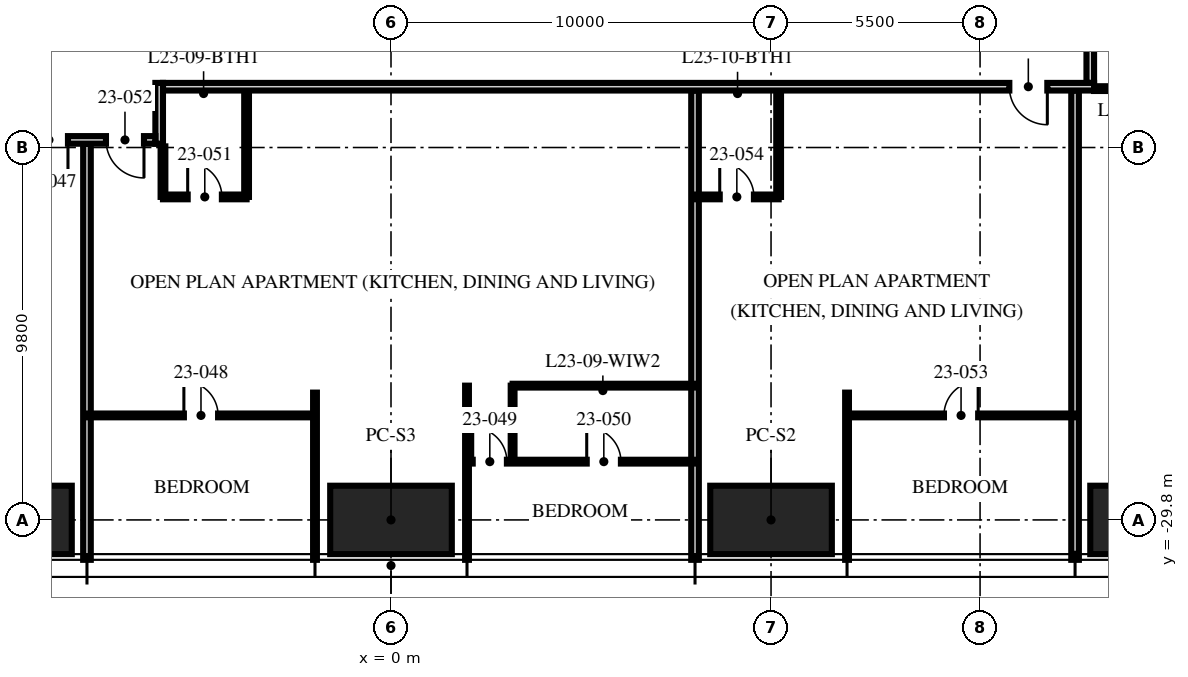
"""IFC4 building model, lengths in metres.
Left out: names, types, materials, properties, quantities, classifications, styles, units other than length and angle.
Written with IfcOpenShell. Run it as: python <this file> out.ifc"""

import sys

from ifc_helpers import new_model, si_unit, direction, frame, frame_2d, origin, origin_2d, place, context, subcontext, project, spatial, rectangle, hollow_rectangle, extrude, element, fill, save


model = new_model("IFC4")
c1 = context("Model", 3, precision=1e-05, world=origin(), true_north=direction((0.0, 1.0)))
c2 = subcontext(c1, "Body", "Model", "MODEL_VIEW")
j1 = project(units=[si_unit("LENGTHUNIT", "METRE"), si_unit("PLANEANGLEUNIT", "RADIAN")], contexts=[c1])
p1 = place(None, origin())
s1 = spatial("IfcSite", under=j1, at=p1, CompositionType="ELEMENT")
p2 = place(p1, origin())
s2 = spatial("IfcBuilding", under=s1, at=p2, CompositionType="ELEMENT")
p3 = place(p2, frame((0.0, 0.0, 92.25)))
s3 = spatial("IfcBuildingStorey", under=s2, at=p3, CompositionType="ELEMENT", Elevation=92.25)
for number, where, z_axis, x_axis in (
    (1, (20.0, -29.8, 0.0), (0.0, 0.0, 1.0), (1.0, 0.0, 0.0)),
    (2, (10.0, -29.8, 0.0), (0.0, 0.0, 1.0), (1.0, 0.0, 0.0)),
    (3, (0.0, -29.8, 0.0), (0.0, 0.0, 1.0), (1.0, 0.0, 0.0)),
    (4, (-10.0, -29.8, 0.0), (0.0, 0.0, 1.0), (1.0, 0.0, 0.0)),
):
    element("IfcColumn", number, at=place(p3, frame(where, z_axis=z_axis, x_axis=x_axis)), inside=s3, PredefinedType="COLUMN", context=c2, shape_type="SweptSolid", body=[
        extrude(hollow_rectangle(XDim=3.2, YDim=1.8, WallThickness=0.2, at=origin_2d()), origin(), (0.0, 0.0, 1.0), 3.75),
    ])
p4 = place(p3, frame((-8.0, -19.9, 0.0), z_axis=(0.0, 0.0, 1.0), x_axis=(0.0, -1.0, 0.0)))
e5 = element("IfcWall", 5, at=p4, inside=s3, PredefinedType="PARTITIONING", context=c2, shape_type="SweptSolid", body=[
    extrude(rectangle(XDim=10.95, YDim=0.2, at=frame_2d((5.475, 0.0))), origin(), (0.0, 0.0, 1.0), 2.61),
])
p5 = place(p3, frame((-2.0, -26.45, 0.0), z_axis=(0.0, 0.0, 1.0), x_axis=(0.0, -1.0, 0.0)))
e6 = element("IfcWall", 6, at=p5, inside=s3, PredefinedType="PARTITIONING", context=c2, shape_type="SweptSolid", body=[
    extrude(rectangle(XDim=4.4, YDim=0.1, at=frame_2d((2.2, 0.0))), origin(), (0.0, 0.0, 1.0), 2.61),
])
p6 = place(p3, frame((2.0, -26.267, 0.0), z_axis=(0.0, 0.0, 1.0), x_axis=(0.0, -1.0, 0.0)))
e7 = element("IfcWall", 7, at=p6, inside=s3, PredefinedType="PARTITIONING", context=c2, shape_type="SweptSolid", body=[
    extrude(rectangle(XDim=4.583, YDim=0.1, at=frame_2d((2.292, 0.0))), origin(), (0.0, 0.0, 1.0), 2.61),
])
p7 = place(p3, frame((8.0, -18.5, 0.0), z_axis=(0.0, 0.0, 1.0), x_axis=(0.0, -1.0, 0.0)))
e8 = element("IfcWall", 8, at=p7, inside=s3, PredefinedType="PARTITIONING", context=c2, shape_type="SweptSolid", body=[
    extrude(rectangle(XDim=12.35, YDim=0.2, at=frame_2d((6.175, 0.0))), origin(), (0.0, 0.0, 1.0), 2.61),
])
p8 = place(p3, frame((12.0, -26.45, 0.0), z_axis=(0.0, 0.0, 1.0), x_axis=(0.0, -1.0, 0.0)))
e9 = element("IfcWall", 9, at=p8, inside=s3, PredefinedType="PARTITIONING", context=c2, shape_type="SweptSolid", body=[
    extrude(rectangle(XDim=4.4, YDim=0.1, at=frame_2d((2.2, 0.0))), origin(), (0.0, 0.0, 1.0), 2.61),
])
p9 = place(p3, frame((18.0, -18.5, 0.0), z_axis=(0.0, 0.0, 1.0), x_axis=(0.0, -1.0, 0.0)))
e10 = element("IfcWall", 10, at=p9, inside=s3, PredefinedType="PARTITIONING", context=c2, shape_type="SweptSolid", body=[
    extrude(rectangle(XDim=12.35, YDim=0.2, at=frame_2d((6.175, 0.0))), origin(), (0.0, 0.0, 1.0), 2.3),
])
p10 = place(p3, frame((-8.0, -27.05, 0.0), z_axis=(0.0, 0.0, 1.0), x_axis=(1.0, 0.0, 0.0)))
e11 = element("IfcWall", 11, at=p10, inside=s3, PredefinedType="PARTITIONING", context=c2, shape_type="SweptSolid", body=[
    extrude(rectangle(XDim=6.0, YDim=0.1, at=frame_2d((3.0, 0.0))), origin(), (0.0, 0.0, 1.0), 2.6),
])
p11 = place(p10, frame((2.55, 0.0, 0.0)))
e12 = element("IfcOpeningElement", 12, at=p11, cuts=e11, PredefinedType="OPENING", context=c2, shape_type="SweptSolid", body=[
    extrude(rectangle(XDim=0.9, YDim=2.1, at=frame_2d((0.45, 1.05))), frame((0.0, 0.06, 0.0), z_axis=(0.0, -1.0, 0.0), x_axis=(1.0, 0.0, 0.0)), (0.0, 0.0, 1.0), 0.12),
])
p12 = place(p3, frame((2.0, -28.267, 0.0), z_axis=(0.0, 0.0, 1.0), x_axis=(1.0, 0.0, 0.0)))
e13 = element("IfcWall", 13, at=p12, inside=s3, PredefinedType="PARTITIONING", context=c2, shape_type="SweptSolid", body=[
    extrude(rectangle(XDim=6.0, YDim=0.1, at=frame_2d((3.0, 0.0))), origin(), (0.0, 0.0, 1.0), 2.6),
])
p13 = place(p12, frame((0.15, 0.0, 0.0)))
e14 = element("IfcOpeningElement", 14, at=p13, cuts=e13, PredefinedType="OPENING", context=c2, shape_type="SweptSolid", body=[
    extrude(rectangle(XDim=0.9, YDim=2.1, at=frame_2d((0.45, 1.05))), frame((0.0, 0.06, 0.0), z_axis=(0.0, -1.0, 0.0), x_axis=(1.0, 0.0, 0.0)), (0.0, 0.0, 1.0), 0.12),
])
p14 = place(p12, frame((3.15, 0.0, 0.0)))
e15 = element("IfcOpeningElement", 15, at=p14, cuts=e13, PredefinedType="OPENING", context=c2, shape_type="SweptSolid", body=[
    extrude(rectangle(XDim=0.9, YDim=2.1, at=frame_2d((0.45, 1.05))), frame((0.0, 0.06, 0.0), z_axis=(0.0, -1.0, 0.0), x_axis=(1.0, 0.0, 0.0)), (0.0, 0.0, 1.0), 0.12),
])
p15 = place(p3, frame((3.2, -26.267, 0.0), z_axis=(0.0, 0.0, 1.0), x_axis=(0.0, -1.0, 0.0)))
e16 = element("IfcWall", 16, at=p15, inside=s3, PredefinedType="PARTITIONING", context=c2, shape_type="SweptSolid", body=[
    extrude(rectangle(XDim=2.0, YDim=0.1, at=frame_2d((1.0, 0.0))), origin(), (0.0, 0.0, 1.0), 3.5),
])
p16 = place(p3, frame((3.2, -26.267, 0.0), z_axis=(0.0, 0.0, 1.0), x_axis=(1.0, 0.0, 0.0)))
e17 = element("IfcWall", 17, at=p16, inside=s3, PredefinedType="PARTITIONING", context=c2, shape_type="SweptSolid", body=[
    extrude(rectangle(XDim=4.8, YDim=0.1, at=frame_2d((2.4, 0.0))), origin(), (0.0, 0.0, 1.0), 2.6),
])
p17 = place(p3, frame((-6.0, -21.3, 0.0), z_axis=(0.0, 0.0, 1.0), x_axis=(1.0, 0.0, 0.0)))
e18 = element("IfcWall", 18, at=p17, inside=s3, PredefinedType="PARTITIONING", context=c2, shape_type="SweptSolid", body=[
    extrude(rectangle(XDim=2.2, YDim=0.125, at=frame_2d((1.1, 0.0))), origin(), (0.0, 0.0, 1.0), 2.6),
])
p18 = place(p17, frame((0.65, 0.0, 0.0)))
e19 = element("IfcOpeningElement", 19, at=p18, cuts=e18, PredefinedType="OPENING", context=c2, shape_type="SweptSolid", body=[
    extrude(rectangle(XDim=0.9, YDim=2.1, at=frame_2d((0.45, 1.05))), frame((0.0, 0.073, 0.0), z_axis=(0.0, -1.0, 0.0), x_axis=(1.0, 0.0, 0.0)), (0.0, 0.0, 1.0), 0.145),
])
p19 = place(p3, frame((-6.0, -19.97, 0.0), z_axis=(0.0, 0.0, 1.0), x_axis=(0.0, -1.0, 0.0)))
e20 = element("IfcWall", 20, at=p19, inside=s3, PredefinedType="PARTITIONING", context=c2, shape_type="SweptSolid", body=[
    extrude(rectangle(XDim=1.33, YDim=0.125, at=frame_2d((0.665, 0.0))), origin(), (0.0, 0.0, 1.0), 3.5),
])
p20 = place(p3, frame((-3.8, -18.5, 0.0), z_axis=(0.0, 0.0, 1.0), x_axis=(0.0, -1.0, 0.0)))
e21 = element("IfcWall", 21, at=p20, inside=s3, PredefinedType="PARTITIONING", context=c2, shape_type="SweptSolid", body=[
    extrude(rectangle(XDim=2.8, YDim=0.125, at=frame_2d((1.4, 0.0))), origin(), (0.0, 0.0, 1.0), 3.5),
])
p21 = place(p3, frame((12.0, -27.05, 0.0), z_axis=(0.0, 0.0, 1.0), x_axis=(1.0, 0.0, 0.0)))
e22 = element("IfcWall", 22, at=p21, inside=s3, PredefinedType="PARTITIONING", context=c2, shape_type="SweptSolid", body=[
    extrude(rectangle(XDim=6.0, YDim=0.1, at=frame_2d((3.0, 0.0))), origin(), (0.0, 0.0, 1.0), 2.6),
])
p22 = place(p21, frame((2.55, 0.0, 0.0)))
e23 = element("IfcOpeningElement", 23, at=p22, cuts=e22, PredefinedType="OPENING", context=c2, shape_type="SweptSolid", body=[
    extrude(rectangle(XDim=0.9, YDim=2.1, at=frame_2d((0.45, 1.05))), frame((0.0, 0.06, 0.0), z_axis=(0.0, -1.0, 0.0), x_axis=(1.0, 0.0, 0.0)), (0.0, 0.0, 1.0), 0.12),
])
p23 = place(p3, frame((8.0, -21.3, 0.0), z_axis=(0.0, 0.0, 1.0), x_axis=(1.0, 0.0, 0.0)))
e24 = element("IfcWall", 24, at=p23, inside=s3, PredefinedType="PARTITIONING", context=c2, shape_type="SweptSolid", body=[
    extrude(rectangle(XDim=2.2, YDim=0.125, at=frame_2d((1.1, 0.0))), origin(), (0.0, 0.0, 1.0), 2.492),
])
p24 = place(p23, frame((0.65, 0.0, 0.0)))
e25 = element("IfcOpeningElement", 25, at=p24, cuts=e24, PredefinedType="OPENING", context=c2, shape_type="SweptSolid", body=[
    extrude(rectangle(XDim=0.9, YDim=2.1, at=frame_2d((0.45, 1.05))), frame((0.0, 0.073, 0.0), z_axis=(0.0, -1.0, 0.0), x_axis=(1.0, 0.0, 0.0)), (0.0, 0.0, 1.0), 0.145),
])
p25 = place(p3, frame((10.2, -18.5, 0.0), z_axis=(0.0, 0.0, 1.0), x_axis=(0.0, -1.0, 0.0)))
e26 = element("IfcWall", 26, at=p25, inside=s3, PredefinedType="PARTITIONING", context=c2, shape_type="SweptSolid", body=[
    extrude(rectangle(XDim=2.8, YDim=0.125, at=frame_2d((1.4, 0.0))), origin(), (0.0, 0.0, 1.0), 2.492),
])
p26 = place(p3, frame((18.5, -18.45, 0.0), z_axis=(0.0, 0.0, 1.0), x_axis=(1.0, 0.0, 0.0)))
e27 = element("IfcWall", 27, at=p26, inside=s3, PredefinedType="PARTITIONING", context=c2, shape_type="SweptSolid", body=[
    extrude(rectangle(XDim=2.8, YDim=0.125, at=frame_2d((1.4, 0.0))), origin(), (0.0, 0.0, 1.0), 2.3),
])
p27 = place(p3, frame((18.4, -18.3, 0.0), z_axis=(0.0, 0.0, 1.0), x_axis=(0.0, 1.0, 0.0)))
e28 = element("IfcWall", 28, at=p27, inside=s3, PredefinedType="PARTITIONING", context=c2, shape_type="SweptSolid", body=[
    extrude(rectangle(XDim=36.6, YDim=0.2, at=frame_2d((18.3, 0.0))), origin(), (0.0, 0.0, 1.0), 2.3),
])
p28 = place(p27, frame((24.57, 0.0, 0.0)))
e29 = element("IfcOpeningElement", 29, at=p28, cuts=e28, PredefinedType="OPENING", context=c2, shape_type="SweptSolid", body=[
    extrude(rectangle(XDim=1.0, YDim=2.2, at=frame_2d((0.5, 1.1))), frame((0.0, 0.11, 0.0), z_axis=(0.0, -1.0, 0.0), x_axis=(1.0, 0.0, 0.0)), (0.0, 0.0, 1.0), 0.22),
])
p29 = place(p27, frame((34.82, 0.0, 0.0)))
e30 = element("IfcOpeningElement", 30, at=p29, cuts=e28, PredefinedType="OPENING", context=c2, shape_type="SweptSolid", body=[
    extrude(rectangle(XDim=1.0, YDim=2.2, at=frame_2d((0.5, 1.1))), frame((0.0, 0.11, 0.0), z_axis=(0.0, -1.0, 0.0), x_axis=(1.0, 0.0, 0.0)), (0.0, 0.0, 1.0), 0.22),
])
p30 = place(p27, frame((8.7, 0.0, 0.0)))
e31 = element("IfcOpeningElement", 31, at=p30, cuts=e28, PredefinedType="OPENING", context=c2, shape_type="SweptSolid", body=[
    extrude(rectangle(XDim=1.0, YDim=2.2, at=frame_2d((0.5, 1.1))), frame((0.0, 0.11, 0.0), z_axis=(0.0, -1.0, 0.0), x_axis=(1.0, 0.0, 0.0)), (0.0, 0.0, 1.0), 0.22),
])
p31 = place(p3, frame((18.5, -18.4, 0.0), z_axis=(0.0, 0.0, 1.0), x_axis=(-1.0, 0.0, 0.0)))
e32 = element("IfcWall", 32, at=p31, inside=s3, PredefinedType="PARTITIONING", context=c2, shape_type="SweptSolid", body=[
    extrude(rectangle(XDim=24.5, YDim=0.2, at=frame_2d((12.25, 0.0))), origin(), (0.0, 0.0, 1.0), 2.3),
])
p32 = place(p31, frame((1.23, 0.0, 0.0)))
e33 = element("IfcOpeningElement", 33, at=p32, cuts=e32, PredefinedType="OPENING", context=c2, shape_type="SweptSolid", body=[
    extrude(rectangle(XDim=1.0, YDim=2.2, at=frame_2d((0.5, 1.1))), frame((0.0, 0.11, 0.0), z_axis=(0.0, -1.0, 0.0), x_axis=(1.0, 0.0, 0.0)), (0.0, 0.0, 1.0), 0.22),
])
p33 = place(p3, frame((-6.1, -18.3, 0.0), z_axis=(0.0, 0.0, 1.0), x_axis=(0.0, -1.0, 0.0)))
e34 = element("IfcWall", 34, at=p33, inside=s3, PredefinedType="PARTITIONING", context=c2, shape_type="SweptSolid", body=[
    extrude(rectangle(XDim=1.6, YDim=0.2, at=frame_2d((0.8, 0.0))), origin(), (0.0, 0.0, 1.0), 3.5),
])
p34 = place(p3, frame((-6.2, -19.8, 0.0), z_axis=(0.0, 0.0, 1.0), x_axis=(-1.0, 0.0, 0.0)))
e35 = element("IfcWall", 35, at=p34, inside=s3, PredefinedType="PARTITIONING", context=c2, shape_type="SweptSolid", body=[
    extrude(rectangle(XDim=3.6, YDim=0.2, at=frame_2d((1.8, 0.0))), origin(), (0.0, 0.0, 1.0), 3.5),
])
p35 = place(p34, frame((2.3, 0.0, 0.0)))
e36 = element("IfcOpeningElement", 36, at=p35, cuts=e35, PredefinedType="OPENING", context=c2, shape_type="SweptSolid", body=[
    extrude(rectangle(XDim=1.0, YDim=2.2, at=frame_2d((0.5, 1.1))), frame((0.0, 0.11, 0.0), z_axis=(0.0, -1.0, 0.0), x_axis=(1.0, 0.0, 0.0)), (0.0, 0.0, 1.0), 0.22),
])
p36 = place(p34, frame((0.3, 0.0, 0.0)))
e37 = element("IfcOpeningElement", 37, at=p36, cuts=e35, PredefinedType="OPENING", context=c2, shape_type="SweptSolid", body=[
    extrude(rectangle(XDim=1.0, YDim=2.2, at=frame_2d((0.5, 1.1))), frame((0.0, 0.11, 0.0), z_axis=(0.0, -1.0, 0.0), x_axis=(1.0, 0.0, 0.0)), (0.0, 0.0, 1.0), 0.22),
])
p37 = place(p35, origin())
e38 = element("IfcDoor", 38, at=p37, inside=s3, OperationType="SINGLE_SWING_LEFT", PredefinedType="DOOR", context=c2, shape_type="SweptSolid", body=[
    extrude(rectangle(XDim=1.0, YDim=2.2, at=frame_2d((0.5, 1.1))), frame((0.0, 0.025, 0.0), z_axis=(0.0, -1.0, 0.0), x_axis=(1.0, 0.0, 0.0)), (0.0, 0.0, 1.0), 0.05),
])
fill(e36, e38)
p38 = place(p11, origin())
e39 = element("IfcDoor", 39, at=p38, inside=s3, OperationType="SINGLE_SWING_LEFT", PredefinedType="DOOR", context=c2, shape_type="SweptSolid", body=[
    extrude(rectangle(XDim=0.9, YDim=2.1, at=frame_2d((0.45, 1.05))), frame((0.0, 0.025, 0.0), z_axis=(0.0, -1.0, 0.0), x_axis=(1.0, 0.0, 0.0)), (0.0, 0.0, 1.0), 0.05),
])
fill(e12, e39)
p39 = place(p13, origin())
e40 = element("IfcDoor", 40, at=p39, inside=s3, OperationType="SINGLE_SWING_LEFT", PredefinedType="DOOR", context=c2, shape_type="SweptSolid", body=[
    extrude(rectangle(XDim=0.9, YDim=2.1, at=frame_2d((0.45, 1.05))), frame((0.0, 0.025, 0.0), z_axis=(0.0, -1.0, 0.0), x_axis=(1.0, 0.0, 0.0)), (0.0, 0.0, 1.0), 0.05),
])
fill(e14, e40)
p40 = place(p14, origin())
e41 = element("IfcDoor", 41, at=p40, inside=s3, OperationType="SINGLE_SWING_LEFT", PredefinedType="DOOR", context=c2, shape_type="SweptSolid", body=[
    extrude(rectangle(XDim=0.9, YDim=2.1, at=frame_2d((0.45, 1.05))), frame((0.0, 0.025, 0.0), z_axis=(0.0, -1.0, 0.0), x_axis=(1.0, 0.0, 0.0)), (0.0, 0.0, 1.0), 0.05),
])
fill(e15, e41)
p41 = place(p18, origin())
e42 = element("IfcDoor", 42, at=p41, inside=s3, OperationType="SINGLE_SWING_LEFT", PredefinedType="DOOR", context=c2, shape_type="SweptSolid", body=[
    extrude(rectangle(XDim=0.9, YDim=2.1, at=frame_2d((0.45, 1.05))), frame((0.0, 0.025, 0.0), z_axis=(0.0, -1.0, 0.0), x_axis=(1.0, 0.0, 0.0)), (0.0, 0.0, 1.0), 0.05),
])
fill(e19, e42)
p42 = place(p36, origin())
e43 = element("IfcDoor", 43, at=p42, inside=s3, OperationType="SINGLE_SWING_LEFT", PredefinedType="DOOR", context=c2, shape_type="SweptSolid", body=[
    extrude(rectangle(XDim=1.0, YDim=2.2, at=frame_2d((0.5, 1.1))), frame((0.0, 0.025, 0.0), z_axis=(0.0, -1.0, 0.0), x_axis=(1.0, 0.0, 0.0)), (0.0, 0.0, 1.0), 0.05),
])
fill(e37, e43)
p43 = place(p22, origin())
e44 = element("IfcDoor", 44, at=p43, inside=s3, OperationType="SINGLE_SWING_RIGHT", PredefinedType="DOOR", context=c2, shape_type="SweptSolid", body=[
    extrude(rectangle(XDim=0.9, YDim=2.1, at=frame_2d((0.45, 1.05))), frame((0.0, 0.025, 0.0), z_axis=(0.0, -1.0, 0.0), x_axis=(1.0, 0.0, 0.0)), (0.0, 0.0, 1.0), 0.05),
])
fill(e23, e44)
p44 = place(p24, origin())
e45 = element("IfcDoor", 45, at=p44, inside=s3, OperationType="SINGLE_SWING_LEFT", PredefinedType="DOOR", context=c2, shape_type="SweptSolid", body=[
    extrude(rectangle(XDim=0.9, YDim=2.1, at=frame_2d((0.45, 1.05))), frame((0.0, 0.025, 0.0), z_axis=(0.0, -1.0, 0.0), x_axis=(1.0, 0.0, 0.0)), (0.0, 0.0, 1.0), 0.05),
])
fill(e25, e45)
p45 = place(p32, origin())
e46 = element("IfcDoor", 46, at=p45, inside=s3, OperationType="SINGLE_SWING_LEFT", PredefinedType="DOOR", context=c2, shape_type="SweptSolid", body=[
    extrude(rectangle(XDim=1.0, YDim=2.2, at=frame_2d((0.5, 1.1))), frame((0.0, 0.025, 0.0), z_axis=(0.0, -1.0, 0.0), x_axis=(1.0, 0.0, 0.0)), (0.0, 0.0, 1.0), 0.05),
])
fill(e33, e46)
save(model, sys.argv[1])
